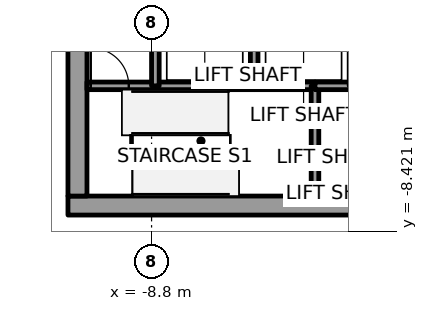
"""IFC4 building model, lengths in metres.
Left out: names, types, materials, properties, quantities, classifications, styles, units other than length and angle.
Written with IfcOpenShell. Run it as: python <this file> out.ifc"""

import sys

from ifc_helpers import new_model, si_unit, direction, frame, frame_2d, origin, place, context, subcontext, project, spatial, rectangle, extrude, element, fill, save


model = new_model("IFC4")
c1 = context("Model", 3, precision=1e-05, world=origin(), true_north=direction((0.0, 1.0)))
c2 = subcontext(c1, "Body", "Model", "MODEL_VIEW")
j1 = project(units=[si_unit("LENGTHUNIT", "METRE"), si_unit("PLANEANGLEUNIT", "RADIAN")], contexts=[c1])
p1 = place(None, origin())
s1 = spatial("IfcSite", under=j1, at=p1, CompositionType="ELEMENT")
p2 = place(p1, origin())
s2 = spatial("IfcBuilding", under=s1, at=p2, CompositionType="ELEMENT")
p3 = place(p2, frame((0.0, 0.0, 22.2)))
s3 = spatial("IfcBuildingStorey", under=s2, at=p3, CompositionType="ELEMENT", Elevation=22.2)
p4 = place(p3, frame((-11.0, -7.75, 0.0), z_axis=(0.0, 0.0, 1.0), x_axis=(1.0, 0.0, 0.0)))
e1 = element("IfcWall", 1, at=p4, inside=s3, PredefinedType="SHEAR", context=c2, shape_type="SweptSolid", body=[
    extrude(rectangle(XDim=22.0, YDim=0.5, at=frame_2d((11.0, 0.0))), origin(), (0.0, 0.0, 1.0), 6.6),
])
p5 = place(p4, frame((10.45, 0.0, 0.0)))
e2 = element("IfcOpeningElement", 2, at=p5, cuts=e1, PredefinedType="OPENING", context=c2, shape_type="SweptSolid", body=[
    extrude(rectangle(XDim=1.1, YDim=2.1, at=frame_2d((0.55, 1.05))), frame((0.0, 0.25, 0.0), z_axis=(0.0, -1.0, 0.0), x_axis=(1.0, 0.0, 0.0)), (0.0, 0.0, 1.0), 0.5),
])
p6 = place(p3, frame((-10.75, -7.5, 0.0), z_axis=(0.0, 0.0, 1.0), x_axis=(0.0, 1.0, 0.0)))
e3 = element("IfcWall", 3, at=p6, inside=s3, PredefinedType="SHEAR", context=c2, shape_type="SweptSolid", body=[
    extrude(rectangle(XDim=15.0, YDim=0.5, at=frame_2d((7.5, 0.0))), origin(), (0.0, 0.0, 1.0), 6.6),
])
p7 = place(p6, frame((6.6, 0.0, 0.0)))
e4 = element("IfcOpeningElement", 4, at=p7, cuts=e3, PredefinedType="OPENING", context=c2, shape_type="SweptSolid", body=[
    extrude(rectangle(XDim=1.8, YDim=2.1, at=frame_2d((0.9, 1.05))), frame((0.0, 0.25, 0.0), z_axis=(0.0, -1.0, 0.0), x_axis=(1.0, 0.0, 0.0)), (0.0, 0.0, 1.0), 0.5),
])
p8 = place(p3, frame((-10.5, -4.6, 0.0), z_axis=(0.0, 0.0, 1.0), x_axis=(1.0, 0.0, 0.0)))
e5 = element("IfcWall", 5, at=p8, inside=s3, PredefinedType="SOLIDWALL", context=c2, shape_type="SweptSolid", body=[
    extrude(rectangle(XDim=1.8, YDim=0.2, at=frame_2d((0.9, 0.0))), origin(), (0.0, 0.0, 1.0), 6.35),
])
p9 = place(p8, frame((0.1, 0.0, 0.0)))
e6 = element("IfcOpeningElement", 6, at=p9, cuts=e5, PredefinedType="OPENING", context=c2, shape_type="SweptSolid", body=[
    extrude(rectangle(XDim=1.0, YDim=2.1, at=frame_2d((0.5, 1.05))), frame((0.0, 0.1, 0.0), z_axis=(0.0, -1.0, 0.0), x_axis=(1.0, 0.0, 0.0)), (0.0, 0.0, 1.0), 0.2),
])
p10 = place(p3, frame((-8.7, -4.6, 0.0), z_axis=(0.0, 0.0, 1.0), x_axis=(1.0, 0.0, 0.0)))
e7 = element("IfcWall", 7, at=p10, inside=s3, PredefinedType="SOLIDWALL", context=c2, shape_type="SweptSolid", body=[
    extrude(rectangle(XDim=2.6, YDim=0.2, at=frame_2d((1.3, 0.0))), origin(), (0.0, 0.0, 1.0), 6.35),
])
p11 = place(p3, frame((-8.7, -4.6, 0.0), z_axis=(0.0, 0.0, 1.0), x_axis=(0.0, 1.0, 0.0)))
e8 = element("IfcWall", 8, at=p11, inside=s3, PredefinedType="SOLIDWALL", context=c2, shape_type="SweptSolid", body=[
    extrude(rectangle(XDim=2.8, YDim=0.2, at=frame_2d((1.4, 0.0))), origin(), (0.0, 0.0, 1.0), 6.35),
])
p12 = place(p3, frame((-6.1, -4.6, 0.0), z_axis=(0.0, 0.0, 1.0), x_axis=(1.0, 0.0, 0.0)))
e9 = element("IfcWall", 9, at=p12, inside=s3, PredefinedType="SOLIDWALL", context=c2, shape_type="SweptSolid", body=[
    extrude(rectangle(XDim=1.6, YDim=0.2, at=frame_2d((0.8, 0.0))), origin(), (0.0, 0.0, 1.0), 6.35),
])
p13 = place(p3, frame((-6.1, -4.6, 0.0), z_axis=(0.0, 0.0, 1.0), x_axis=(0.0, 1.0, 0.0)))
e10 = element("IfcWall", 10, at=p13, inside=s3, PredefinedType="SOLIDWALL", context=c2, shape_type="SweptSolid", body=[
    extrude(rectangle(XDim=2.8, YDim=0.2, at=frame_2d((1.4, 0.0))), origin(), (0.0, 0.0, 1.0), 6.35),
])
p14 = place(p3, frame((-4.5, -4.6, 0.0), z_axis=(0.0, 0.0, 1.0), x_axis=(0.0, -1.0, 0.0)))
e11 = element("IfcWall", 11, at=p14, inside=s3, PredefinedType="SOLIDWALL", context=c2, shape_type="SweptSolid", body=[
    extrude(rectangle(XDim=2.9, YDim=0.2, at=frame_2d((1.45, 0.0))), origin(), (0.0, 0.0, 1.0), 6.35),
])
p15 = place(p3, frame((-4.5, -4.6, 0.0), z_axis=(0.0, 0.0, 1.0), x_axis=(1.0, 0.0, 0.0)))
e12 = element("IfcWall", 12, at=p15, inside=s3, PredefinedType="SOLIDWALL", context=c2, shape_type="SweptSolid", body=[
    extrude(rectangle(XDim=1.0, YDim=0.2, at=frame_2d((0.5, 0.0))), origin(), (0.0, 0.0, 1.0), 6.35),
])
p16 = place(p9, origin())
e13 = element("IfcDoor", 13, at=p16, inside=s3, OperationType="SINGLE_SWING_LEFT", PredefinedType="DOOR", context=c2, shape_type="SweptSolid", body=[
    extrude(rectangle(XDim=1.0, YDim=2.1, at=frame_2d((0.5, 1.05))), frame((0.0, 0.025, 0.0), z_axis=(0.0, -1.0, 0.0), x_axis=(1.0, 0.0, 0.0)), (0.0, 0.0, 1.0), 0.05),
])
fill(e6, e13)
save(model, sys.argv[1])
